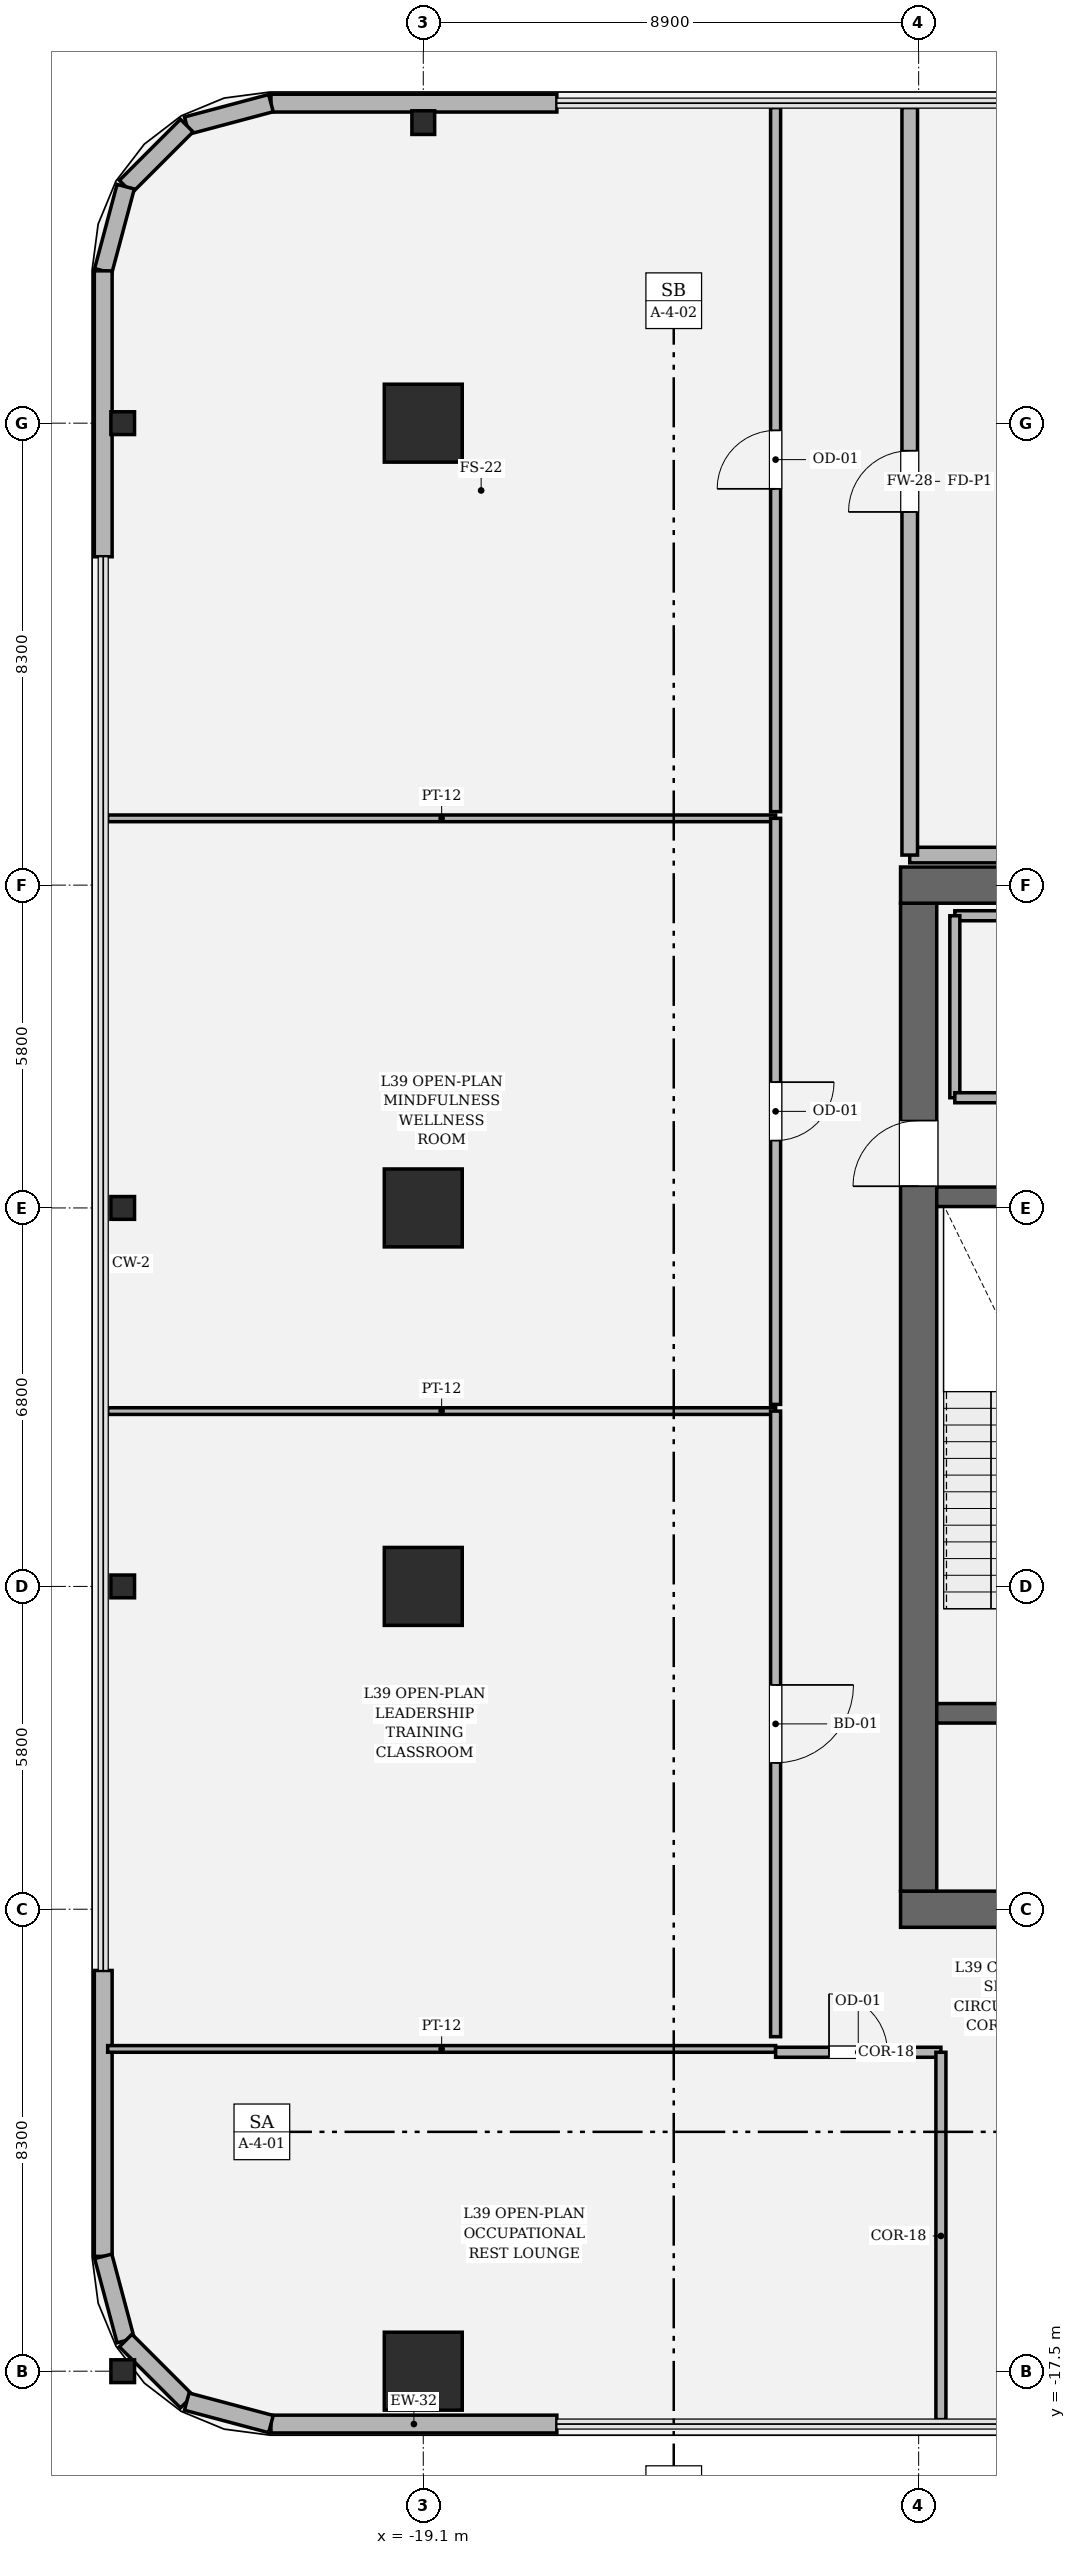
"""IFC4 building model, lengths in metres.
Left out: names, types, materials, properties, quantities, classifications, styles, units other than length and angle.
Written with IfcOpenShell. Run it as: python <this file> out.ifc"""

import sys

from ifc_helpers import new_model, si_unit, direction, frame, frame_2d, origin, origin_2d, place, context, subcontext, project, spatial, rectangle, hollow_rectangle, i_section, extrude, element, fill, save


model = new_model("IFC4")
c1 = context("Model", 3, precision=1e-05, world=origin(), true_north=direction((0.0, 1.0)))
c2 = subcontext(c1, "Body", "Model", "MODEL_VIEW")
j1 = project(units=[si_unit("LENGTHUNIT", "METRE"), si_unit("PLANEANGLEUNIT", "RADIAN")], contexts=[c1])
p1 = place(None, origin())
s1 = spatial("IfcSite", under=j1, at=p1, CompositionType="ELEMENT")
p2 = place(p1, origin())
s2 = spatial("IfcBuilding", under=s1, at=p2, CompositionType="ELEMENT")
p3 = place(p2, frame((0.0, 0.0, 168.15)))
s3 = spatial("IfcBuildingStorey", under=s2, at=p3, CompositionType="ELEMENT", Elevation=168.15)
p4 = place(p3, frame((10.525, -9.2, 0.0), z_axis=(0.0, 0.0, 1.0), x_axis=(-1.0, 0.0, 0.0)))
e1 = element("IfcWall", 1, at=p4, inside=s3, PredefinedType="SHEAR", context=c2, shape_type="SweptSolid", body=[
    extrude(rectangle(XDim=21.05, YDim=0.65, at=frame_2d((10.525, 0.0))), origin(), (0.0, 0.0, 1.0), 4.05),
])
p5 = place(p4, frame((2.8, 0.0, 0.0)))
e2 = element("IfcOpeningElement", 2, at=p5, cuts=e1, PredefinedType="OPENING", context=c2, shape_type="SweptSolid", body=[
    extrude(rectangle(XDim=1.25, YDim=2.25, at=frame_2d((0.625, 1.125))), frame((0.0, 0.335, 0.0), z_axis=(0.0, -1.0, 0.0), x_axis=(1.0, 0.0, 0.0)), (0.0, 0.0, 1.0), 0.67),
])
p6 = place(p4, frame((17.0, 0.0, 0.0)))
e3 = element("IfcOpeningElement", 3, at=p6, cuts=e1, PredefinedType="OPENING", context=c2, shape_type="SweptSolid", body=[
    extrude(rectangle(XDim=1.25, YDim=2.25, at=frame_2d((0.625, 1.125))), frame((0.0, 0.335, 0.0), z_axis=(0.0, -1.0, 0.0), x_axis=(1.0, 0.0, 0.0)), (0.0, 0.0, 1.0), 0.67),
])
p7 = place(p3, frame((-10.2, -8.875, 0.0), z_axis=(0.0, 0.0, 1.0), x_axis=(0.0, 1.0, 0.0)))
e4 = element("IfcWall", 4, at=p7, inside=s3, PredefinedType="SHEAR", context=c2, shape_type="SweptSolid", body=[
    extrude(rectangle(XDim=17.75, YDim=0.65, at=frame_2d((8.875, 0.0))), origin(), (0.0, 0.0, 1.0), 4.05),
])
p8 = place(p7, frame((12.665, 0.0, 0.0)))
e5 = element("IfcOpeningElement", 5, at=p8, cuts=e4, PredefinedType="OPENING", context=c2, shape_type="SweptSolid", body=[
    extrude(rectangle(XDim=1.18, YDim=2.2, at=frame_2d((0.59, 1.1))), frame((0.0, 0.335, 0.0), z_axis=(0.0, -1.0, 0.0), x_axis=(1.0, 0.0, 0.0)), (0.0, 0.0, 1.0), 0.67),
])
p9 = place(p3, frame((-10.525, 9.2, 0.0), z_axis=(0.0, 0.0, 1.0), x_axis=(1.0, 0.0, 0.0)))
e6 = element("IfcWall", 6, at=p9, inside=s3, PredefinedType="SHEAR", context=c2, shape_type="SweptSolid", body=[
    extrude(rectangle(XDim=21.05, YDim=0.65, at=frame_2d((10.525, 0.0))), origin(), (0.0, 0.0, 1.0), 4.05),
])
p10 = place(p3, frame((-9.875, -5.68, 0.0), z_axis=(0.0, 0.0, 1.0), x_axis=(1.0, 0.0, 0.0)))
e7 = element("IfcWall", 7, at=p10, inside=s3, PredefinedType="SOLIDWALL", context=c2, shape_type="SweptSolid", body=[
    extrude(rectangle(XDim=5.225, YDim=0.35, at=frame_2d((2.613, 0.0))), origin(), (0.0, 0.0, 1.0), 4.05),
])
p11 = place(p10, frame((1.335, 0.0, 0.0)))
e8 = element("IfcOpeningElement", 8, at=p11, cuts=e7, PredefinedType="OPENING", context=c2, shape_type="SweptSolid", body=[
    extrude(rectangle(XDim=1.18, YDim=2.2, at=frame_2d((0.59, 1.1))), frame((0.0, 0.185, 0.0), z_axis=(0.0, -1.0, 0.0), x_axis=(1.0, 0.0, 0.0)), (0.0, 0.0, 1.0), 0.37),
])
p12 = place(p3, frame((-9.875, 3.6, 0.0), z_axis=(0.0, 0.0, 1.0), x_axis=(1.0, 0.0, 0.0)))
e9 = element("IfcWall", 9, at=p12, inside=s3, PredefinedType="SOLIDWALL", context=c2, shape_type="SweptSolid", body=[
    extrude(rectangle(XDim=5.225, YDim=0.35, at=frame_2d((2.613, 0.0))), origin(), (0.0, 0.0, 1.0), 4.05),
])
for number, where, z_axis, x_axis in (
    (10, (-19.1, -17.5, 0.0), (0.0, 0.0, 1.0), (1.0, 0.0, 0.0)),
    (11, (-19.1, 17.5, 0.0), (0.0, 0.0, 1.0), (1.0, 0.0, 0.0)),
    (12, (-19.1, 3.4, 0.0), (0.0, 0.0, 1.0), (1.0, 0.0, 0.0)),
    (13, (-19.1, -3.4, 0.0), (0.0, 0.0, 1.0), (1.0, 0.0, 0.0)),
):
    element("IfcColumn", number, at=place(p3, frame(where, z_axis=z_axis, x_axis=x_axis)), inside=s3, PredefinedType="COLUMN", context=c2, shape_type="SweptSolid", body=[
        extrude(hollow_rectangle(XDim=1.4, YDim=1.4, WallThickness=0.042, at=origin_2d()), origin(), (0.0, 0.0, 1.0), 4.05),
    ])
for number, where, z_axis, x_axis in (
    (14, (-19.1, 22.9, 0.0), (0.0, 0.0, 1.0), (1.0, 0.0, 0.0)),
    (15, (-24.5, -17.5, 0.0), (0.0, 0.0, 1.0), (0.0, 1.0, 0.0)),
    (16, (-24.5, -3.4, 0.0), (0.0, 0.0, 1.0), (0.0, 1.0, 0.0)),
    (17, (-24.5, 3.4, 0.0), (0.0, 0.0, 1.0), (0.0, 1.0, 0.0)),
    (18, (-24.5, 17.5, 0.0), (0.0, 0.0, 1.0), (0.0, 1.0, 0.0)),
):
    element("IfcColumn", number, at=place(p3, frame(where, z_axis=z_axis, x_axis=x_axis)), inside=s3, PredefinedType="COLUMN", context=c2, shape_type="SweptSolid", body=[
        extrude(i_section(OverallWidth=0.409, OverallDepth=0.425, WebThickness=0.032, FlangeThickness=0.052, FilletRadius=0.018, at=origin_2d()), origin(), (0.0, 0.0, 1.0), 4.048),
    ])
p13 = place(p3, frame((-21.837, -18.45, 0.0), z_axis=(0.0, 0.0, 1.0), x_axis=(1.0, 0.0, 0.0)))
e19 = element("IfcWall", 19, at=p13, inside=s3, PredefinedType="SOLIDWALL", context=c2, shape_type="SweptSolid", body=[
    extrude(rectangle(XDim=5.137, YDim=0.32, at=frame_2d((2.568, 0.0))), origin(), (0.0, 0.0, 1.0), 2.444),
])
p14 = place(p3, frame((-16.7, 23.25, 0.0), z_axis=(0.0, 0.0, 1.0), x_axis=(-1.0, 0.0, 0.0)))
e20 = element("IfcWall", 20, at=p14, inside=s3, PredefinedType="SOLIDWALL", context=c2, shape_type="SweptSolid", body=[
    extrude(rectangle(XDim=5.137, YDim=0.32, at=frame_2d((2.568, 0.0))), origin(), (0.0, 0.0, 1.0), 3.77),
])
p15 = place(p3, frame((-21.837, 23.25, 0.0), z_axis=(0.0, 0.0, 1.0), x_axis=(-0.966224582397, -0.257701486942, 0.0)))
e21 = element("IfcWall", 21, at=p15, inside=s3, PredefinedType="SOLIDWALL", context=c2, shape_type="SweptSolid", body=[
    extrude(rectangle(XDim=1.565, YDim=0.32, at=frame_2d((0.783, 0.0))), origin(), (0.0, 0.0, 1.0), 3.77),
])
p16 = place(p3, frame((-23.349, 22.847, 0.0), z_axis=(0.0, 0.0, 1.0), x_axis=(-0.707028130747, -0.707185422879, 0.0)))
e22 = element("IfcWall", 22, at=p16, inside=s3, PredefinedType="SOLIDWALL", context=c2, shape_type="SweptSolid", body=[
    extrude(rectangle(XDim=1.552, YDim=0.32, at=frame_2d((0.776, 0.0))), origin(), (0.0, 0.0, 1.0), 3.77),
])
p17 = place(p3, frame((-24.447, 21.749, 0.0), z_axis=(0.0, 0.0, 1.0), x_axis=(-0.257847112249, -0.966185730957, 0.0)))
e23 = element("IfcWall", 23, at=p17, inside=s3, PredefinedType="SOLIDWALL", context=c2, shape_type="SweptSolid", body=[
    extrude(rectangle(XDim=1.565, YDim=0.32, at=frame_2d((0.783, 0.0))), origin(), (0.0, 0.0, 1.0), 3.77),
])
p18 = place(p3, frame((-24.85, 20.237, 0.0), z_axis=(0.0, 0.0, 1.0), x_axis=(0.0, -1.0, 0.0)))
e24 = element("IfcWall", 24, at=p18, inside=s3, PredefinedType="SOLIDWALL", context=c2, shape_type="SweptSolid", body=[
    extrude(rectangle(XDim=5.137, YDim=0.32, at=frame_2d((2.568, 0.0))), origin(), (0.0, 0.0, 1.0), 2.444),
])
p19 = place(p3, frame((-24.85, -10.3, 0.0), z_axis=(0.0, 0.0, 1.0), x_axis=(0.0, -1.0, 0.0)))
e25 = element("IfcWall", 25, at=p19, inside=s3, PredefinedType="SOLIDWALL", context=c2, shape_type="SweptSolid", body=[
    extrude(rectangle(XDim=5.137, YDim=0.32, at=frame_2d((2.568, 0.0))), origin(), (0.0, 0.0, 1.0), 2.444),
])
p20 = place(p3, frame((-24.85, -15.437, 0.0), z_axis=(0.0, 0.0, 1.0), x_axis=(0.257847112249, -0.966185730957, 0.0)))
e26 = element("IfcWall", 26, at=p20, inside=s3, PredefinedType="SOLIDWALL", context=c2, shape_type="SweptSolid", body=[
    extrude(rectangle(XDim=1.565, YDim=0.32, at=frame_2d((0.783, 0.0))), origin(), (0.0, 0.0, 1.0), 2.444),
])
p21 = place(p3, frame((-24.447, -16.949, 0.0), z_axis=(0.0, 0.0, 1.0), x_axis=(0.707106781187, -0.707106781187, 0.0)))
e27 = element("IfcWall", 27, at=p21, inside=s3, PredefinedType="SOLIDWALL", context=c2, shape_type="SweptSolid", body=[
    extrude(rectangle(XDim=1.552, YDim=0.32, at=frame_2d((0.776, 0.0))), origin(), (0.0, 0.0, 1.0), 2.444),
])
p22 = place(p3, frame((-23.349, -18.047, 0.0), z_axis=(0.0, 0.0, 1.0), x_axis=(0.966224582397, -0.257701486942, 0.0)))
e28 = element("IfcWall", 28, at=p22, inside=s3, PredefinedType="SOLIDWALL", context=c2, shape_type="SweptSolid", body=[
    extrude(rectangle(XDim=1.565, YDim=0.32, at=frame_2d((0.783, 0.0))), origin(), (0.0, 0.0, 1.0), 3.77),
])
p23 = place(p3, frame((-6.8, 8.65, 0.0), z_axis=(0.0, 0.0, 1.0), x_axis=(-1.0, 0.0, 0.0)))
e29 = element("IfcWall", 29, at=p23, inside=s3, PredefinedType="PARTITIONING", context=c2, shape_type="SweptSolid", body=[
    extrude(rectangle(XDim=2.75, YDim=0.18, at=frame_2d((1.375, 0.0))), origin(), (0.0, 0.0, 1.0), 3.77),
])
p24 = place(p3, frame((-9.55, 8.65, 0.0), z_axis=(0.0, 0.0, 1.0), x_axis=(0.0, -1.0, 0.0)))
e30 = element("IfcWall", 30, at=p24, inside=s3, PredefinedType="PARTITIONING", context=c2, shape_type="SweptSolid", body=[
    extrude(rectangle(XDim=3.27, YDim=0.18, at=frame_2d((1.635, 0.0))), origin(), (0.0, 0.0, 1.0), 3.77),
])
p25 = place(p3, frame((-9.55, 5.38, 0.0), z_axis=(0.0, 0.0, 1.0), x_axis=(1.0, 0.0, 0.0)))
e31 = element("IfcWall", 31, at=p25, inside=s3, PredefinedType="PARTITIONING", context=c2, shape_type="SweptSolid", body=[
    extrude(rectangle(XDim=2.75, YDim=0.18, at=frame_2d((1.375, 0.0))), origin(), (0.0, 0.0, 1.0), 3.77),
])
p26 = place(p25, frame((0.865, 0.0, 0.0)))
e32 = element("IfcOpeningElement", 32, at=p26, cuts=e31, PredefinedType="OPENING", context=c2, shape_type="SweptSolid", body=[
    extrude(rectangle(XDim=1.02, YDim=2.2, at=frame_2d((0.51, 1.1))), frame((0.0, 0.1, 0.0), z_axis=(0.0, -1.0, 0.0), x_axis=(1.0, 0.0, 0.0)), (0.0, 0.0, 1.0), 0.2),
])
p27 = place(p3, frame((-24.77, -11.71, 0.0), z_axis=(0.0, 0.0, 1.0), x_axis=(1.0, 0.0, 0.0)))
e33 = element("IfcWall", 33, at=p27, inside=s3, PredefinedType="PARTITIONING", context=c2, shape_type="SweptSolid", body=[
    extrude(rectangle(XDim=12.0, YDim=0.12, at=frame_2d((6.0, 0.0))), origin(), (0.0, 0.0, 1.0), 2.444),
])
p28 = place(p3, frame((-12.77, -11.77, 0.0), z_axis=(0.0, 0.0, 1.0), x_axis=(1.0, 0.0, 0.0)))
e34 = element("IfcWall", 34, at=p28, inside=s3, PredefinedType="PARTITIONING", context=c2, shape_type="SweptSolid", body=[
    extrude(rectangle(XDim=2.97, YDim=0.18, at=frame_2d((1.485, 0.0))), origin(), (0.0, 0.0, 1.0), 2.444),
])
p29 = place(p28, frame((0.96, 0.0, 0.0)))
e35 = element("IfcOpeningElement", 35, at=p29, cuts=e34, PredefinedType="OPENING", context=c2, shape_type="SweptSolid", body=[
    extrude(rectangle(XDim=1.05, YDim=2.2, at=frame_2d((0.525, 1.1))), frame((0.0, 0.1, 0.0), z_axis=(0.0, -1.0, 0.0), x_axis=(1.0, 0.0, 0.0)), (0.0, 0.0, 1.0), 0.2),
])
p30 = place(p3, frame((-9.8, -11.77, 0.0), z_axis=(0.0, 0.0, 1.0), x_axis=(0.0, -1.0, 0.0)))
e36 = element("IfcWall", 36, at=p30, inside=s3, PredefinedType="PARTITIONING", context=c2, shape_type="SweptSolid", body=[
    extrude(rectangle(XDim=6.6, YDim=0.18, at=frame_2d((3.3, 0.0))), origin(), (0.0, 0.0, 1.0), 2.444),
])
p31 = place(p3, frame((-24.77, -0.25, 0.0), z_axis=(0.0, 0.0, 1.0), x_axis=(1.0, 0.0, 0.0)))
e37 = element("IfcWall", 37, at=p31, inside=s3, PredefinedType="PARTITIONING", context=c2, shape_type="SweptSolid", body=[
    extrude(rectangle(XDim=12.0, YDim=0.12, at=frame_2d((6.0, 0.0))), origin(), (0.0, 0.0, 1.0), 2.444),
])
p32 = place(p3, frame((-12.77, -0.25, 0.0), z_axis=(0.0, 0.0, 1.0), x_axis=(0.0, -1.0, 0.0)))
e38 = element("IfcWall", 38, at=p32, inside=s3, PredefinedType="PARTITIONING", context=c2, shape_type="SweptSolid", body=[
    extrude(rectangle(XDim=11.24, YDim=0.18, at=frame_2d((5.62, 0.0))), origin(), (0.0, 0.0, 1.0), 2.444),
])
p33 = place(p32, frame((4.92, 0.0, 0.0)))
e39 = element("IfcOpeningElement", 39, at=p33, cuts=e38, PredefinedType="OPENING", context=c2, shape_type="SweptSolid", body=[
    extrude(rectangle(XDim=1.4, YDim=2.25, at=frame_2d((0.7, 1.125))), frame((0.0, 0.1, 0.0), z_axis=(0.0, -1.0, 0.0), x_axis=(1.0, 0.0, 0.0)), (0.0, 0.0, 1.0), 0.2),
])
p34 = place(p3, frame((-24.77, 10.4, 0.0), z_axis=(0.0, 0.0, 1.0), x_axis=(1.0, 0.0, 0.0)))
e40 = element("IfcWall", 40, at=p34, inside=s3, PredefinedType="PARTITIONING", context=c2, shape_type="SweptSolid", body=[
    extrude(rectangle(XDim=12.0, YDim=0.12, at=frame_2d((6.0, 0.0))), origin(), (0.0, 0.0, 1.0), 2.444),
])
p35 = place(p3, frame((-12.77, 10.4, 0.0), z_axis=(0.0, 0.0, 1.0), x_axis=(0.0, -1.0, 0.0)))
e41 = element("IfcWall", 41, at=p35, inside=s3, PredefinedType="PARTITIONING", context=c2, shape_type="SweptSolid", body=[
    extrude(rectangle(XDim=10.53, YDim=0.18, at=frame_2d((5.265, 0.0))), origin(), (0.0, 0.0, 1.0), 2.444),
])
p36 = place(p35, frame((4.74, 0.0, 0.0)))
e42 = element("IfcOpeningElement", 42, at=p36, cuts=e41, PredefinedType="OPENING", context=c2, shape_type="SweptSolid", body=[
    extrude(rectangle(XDim=1.05, YDim=2.2, at=frame_2d((0.525, 1.1))), frame((0.0, 0.1, 0.0), z_axis=(0.0, -1.0, 0.0), x_axis=(1.0, 0.0, 0.0)), (0.0, 0.0, 1.0), 0.2),
])
p37 = place(p3, frame((-0.06, 9.74, 0.0), z_axis=(0.0, 0.0, 1.0), x_axis=(-1.0, 0.0, 0.0)))
e43 = element("IfcWall", 43, at=p37, inside=s3, PredefinedType="SOLIDWALL", context=c2, shape_type="SweptSolid", body=[
    extrude(rectangle(XDim=10.3, YDim=0.28, at=frame_2d((5.15, 0.0))), origin(), (0.0, 0.0, 1.0), 2.444),
])
p38 = place(p3, frame((-10.36, 9.74, 0.0), z_axis=(0.0, 0.0, 1.0), x_axis=(0.0, 1.0, 0.0)))
e44 = element("IfcWall", 44, at=p38, inside=s3, PredefinedType="SOLIDWALL", context=c2, shape_type="SweptSolid", body=[
    extrude(rectangle(XDim=13.43, YDim=0.28, at=frame_2d((6.715, 0.0))), origin(), (0.0, 0.0, 1.0), 2.444),
])
p39 = place(p38, frame((6.165, 0.0, 0.0)))
e45 = element("IfcOpeningElement", 45, at=p39, cuts=e44, PredefinedType="OPENING", context=c2, shape_type="SweptSolid", body=[
    extrude(rectangle(XDim=1.1, YDim=2.2, at=frame_2d((0.55, 1.1))), frame((0.0, 0.15, 0.0), z_axis=(0.0, -1.0, 0.0), x_axis=(1.0, 0.0, 0.0)), (0.0, 0.0, 1.0), 0.3),
])
p40 = place(p3, frame((-12.77, 23.17, 0.0), z_axis=(0.0, 0.0, 1.0), x_axis=(0.0, -1.0, 0.0)))
e46 = element("IfcWall", 46, at=p40, inside=s3, PredefinedType="PARTITIONING", context=c2, shape_type="SweptSolid", body=[
    extrude(rectangle(XDim=12.65, YDim=0.18, at=frame_2d((6.325, 0.0))), origin(), (0.0, 0.0, 1.0), 2.444),
])
p41 = place(p40, frame((5.8, 0.0, 0.0)))
e47 = element("IfcOpeningElement", 47, at=p41, cuts=e46, PredefinedType="OPENING", context=c2, shape_type="SweptSolid", body=[
    extrude(rectangle(XDim=1.05, YDim=2.2, at=frame_2d((0.525, 1.1))), frame((0.0, 0.1, 0.0), z_axis=(0.0, -1.0, 0.0), x_axis=(1.0, 0.0, 0.0)), (0.0, 0.0, 1.0), 0.2),
])
p42 = place(p8, origin())
e48 = element("IfcDoor", 48, at=p42, inside=s3, OperationType="SINGLE_SWING_LEFT", PredefinedType="DOOR", context=c2, shape_type="SweptSolid", body=[
    extrude(rectangle(XDim=1.18, YDim=2.2, at=frame_2d((0.59, 1.1))), frame((0.0, 0.025, 0.0), z_axis=(0.0, -1.0, 0.0), x_axis=(1.0, 0.0, 0.0)), (0.0, 0.0, 1.0), 0.05),
])
fill(e5, e48)
p43 = place(p29, origin())
e49 = element("IfcDoor", 49, at=p43, inside=s3, OperationType="SINGLE_SWING_LEFT", PredefinedType="DOOR", context=c2, shape_type="SweptSolid", body=[
    extrude(rectangle(XDim=1.05, YDim=2.2, at=frame_2d((0.525, 1.1))), frame((0.0, 0.025, 0.0), z_axis=(0.0, -1.0, 0.0), x_axis=(1.0, 0.0, 0.0)), (0.0, 0.0, 1.0), 0.05),
])
fill(e35, e49)
p44 = place(p33, origin())
e50 = element("IfcDoor", 50, at=p44, inside=s3, OperationType="SINGLE_SWING_LEFT", PredefinedType="DOOR", context=c2, shape_type="SweptSolid", body=[
    extrude(rectangle(XDim=1.4, YDim=2.25, at=frame_2d((0.7, 1.125))), frame((0.0, 0.025, 0.0), z_axis=(0.0, -1.0, 0.0), x_axis=(1.0, 0.0, 0.0)), (0.0, 0.0, 1.0), 0.05),
])
fill(e39, e50)
p45 = place(p36, origin())
e51 = element("IfcDoor", 51, at=p45, inside=s3, OperationType="SINGLE_SWING_LEFT", PredefinedType="DOOR", context=c2, shape_type="SweptSolid", body=[
    extrude(rectangle(XDim=1.05, YDim=2.2, at=frame_2d((0.525, 1.1))), frame((0.0, 0.025, 0.0), z_axis=(0.0, -1.0, 0.0), x_axis=(1.0, 0.0, 0.0)), (0.0, 0.0, 1.0), 0.05),
])
fill(e42, e51)
p46 = place(p39, origin())
e52 = element("IfcDoor", 52, at=p46, inside=s3, OperationType="SINGLE_SWING_LEFT", PredefinedType="DOOR", context=c2, shape_type="SweptSolid", body=[
    extrude(rectangle(XDim=1.1, YDim=2.2, at=frame_2d((0.55, 1.1))), frame((0.0, 0.025, 0.0), z_axis=(0.0, -1.0, 0.0), x_axis=(1.0, 0.0, 0.0)), (0.0, 0.0, 1.0), 0.05),
])
fill(e45, e52)
p47 = place(p41, origin())
e53 = element("IfcDoor", 53, at=p47, inside=s3, OperationType="SINGLE_SWING_RIGHT", PredefinedType="DOOR", context=c2, shape_type="SweptSolid", body=[
    extrude(rectangle(XDim=1.05, YDim=2.2, at=frame_2d((0.525, 1.1))), frame((0.0, 0.025, 0.0), z_axis=(0.0, -1.0, 0.0), x_axis=(1.0, 0.0, 0.0)), (0.0, 0.0, 1.0), 0.05),
])
fill(e47, e53)
save(model, sys.argv[1])
